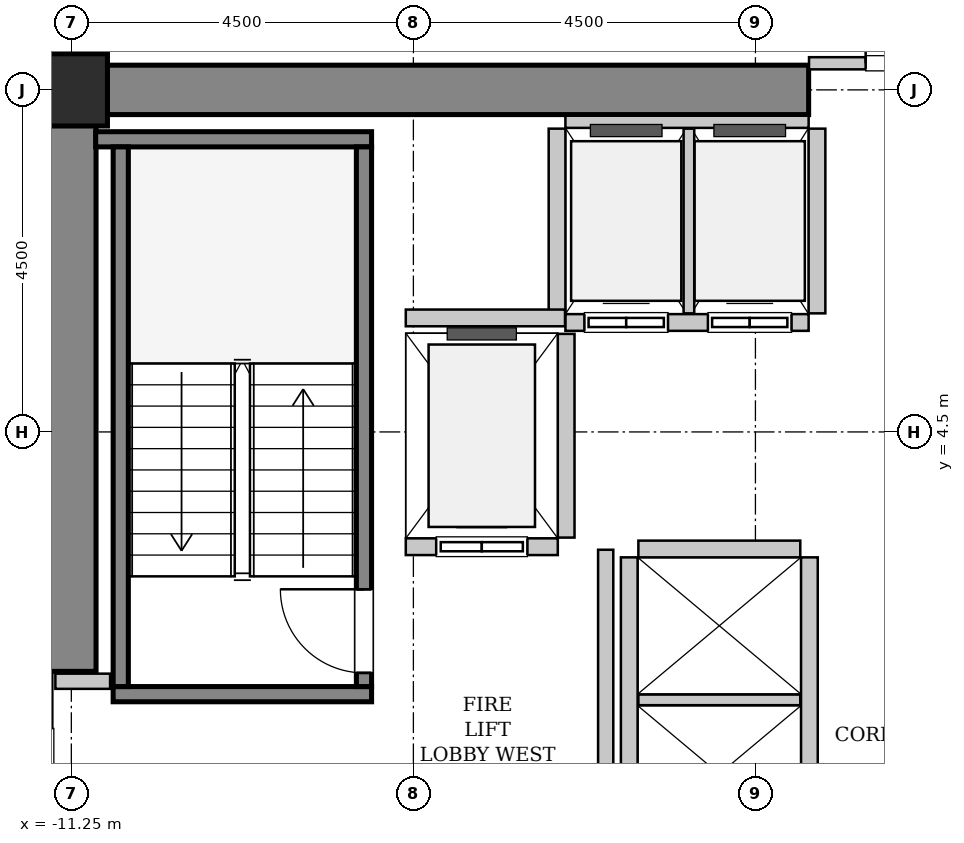
"""IFC4 building model, lengths in metres.
Left out: names, types, materials, properties, quantities, classifications, styles, units other than length and angle.
Written with IfcOpenShell. Run it as: python <this file> out.ifc"""

import sys

from ifc_helpers import new_model, si_unit, direction, frame, frame_2d, origin, origin_2d, place, context, subcontext, project, spatial, rectangle, hollow_rectangle, extrude, source, transform, mapped, element, fill, save


model = new_model("IFC4")
c1 = context("Model", 3, precision=1e-05, world=origin(), true_north=direction((0.0, 1.0)))
c2 = subcontext(c1, "Body", "Model", "MODEL_VIEW")
j1 = project(units=[si_unit("LENGTHUNIT", "METRE"), si_unit("PLANEANGLEUNIT", "RADIAN")], contexts=[c1])
p1 = place(None, origin())
s1 = spatial("IfcSite", under=j1, at=p1, CompositionType="ELEMENT")
p2 = place(p1, origin())
s2 = spatial("IfcBuilding", under=s1, at=p2, CompositionType="ELEMENT")
p3 = place(p2, frame((0.0, 0.0, 55.8)))
s3 = spatial("IfcBuildingStorey", under=s2, at=p3, CompositionType="ELEMENT", Elevation=55.8)
m1 = source(origin(), c2, "Body", "SweptSolid", [
    extrude(rectangle(XDim=10.025, YDim=0.65, at=frame_2d((5.012, 0.0))), origin(), (0.0, 0.0, 1.0), 3.8),
])
p4 = place(p3, frame((-11.575, 9.0, 0.0), z_axis=(0.0, 0.0, 1.0), x_axis=(1.0, 0.0, 0.0)))
e1 = element("IfcWall", 1, at=p4, inside=s3, PredefinedType="SHEAR", context=c2, shape_type="MappedRepresentation", body=[
    mapped(m1, transform((0.0, 0.0, 0.0), x_axis=(1.0, 0.0, 0.0), y_axis=(0.0, 1.0, 0.0), z_axis=(0.0, 0.0, 1.0), scale=1.0)),
])
m2 = source(origin(), c2, "Body", "SweptSolid", [
    extrude(rectangle(XDim=7.325, YDim=0.65, at=frame_2d((3.663, 0.0))), origin(), (0.0, 0.0, 1.0), 3.8),
])
p5 = place(p3, frame((-11.25, 1.35, 0.0), z_axis=(0.0, 0.0, 1.0), x_axis=(0.0, 1.0, 0.0)))
e2 = element("IfcWall", 2, at=p5, inside=s3, PredefinedType="SHEAR", context=c2, shape_type="MappedRepresentation", body=[
    mapped(m2, transform((0.0, 0.0, 0.0), x_axis=(1.0, 0.0, 0.0), y_axis=(0.0, 1.0, 0.0), z_axis=(0.0, 0.0, 1.0), scale=1.0)),
])
m3 = source(origin(), c2, "Body", "SweptSolid", [
    extrude(hollow_rectangle(XDim=0.95, YDim=0.95, WallThickness=0.045, InnerFilletRadius=0.045, OuterFilletRadius=0.09, at=origin_2d()), origin(), (0.0, 0.0, 1.0), 3.8),
])
p6 = place(p3, frame((-11.25, 9.0, 0.0), z_axis=(0.0, 0.0, 1.0), x_axis=(1.0, 0.0, 0.0)))
e3 = element("IfcColumn", 3, at=p6, inside=s3, PredefinedType="COLUMN", context=c2, shape_type="MappedRepresentation", body=[
    mapped(m3, transform((0.0, 0.0, 0.0), x_axis=(1.0, 0.0, 0.0), y_axis=(0.0, 1.0, 0.0), z_axis=(0.0, 0.0, 1.0), scale=1.0)),
])
m4 = source(origin(), c2, "Body", "SweptSolid", [
    extrude(rectangle(XDim=3.4, YDim=0.2, at=frame_2d((1.7, 0.0))), origin(), (0.0, 0.0, 1.0), 3.8),
])
p7 = place(p3, frame((-7.3, 1.05, 0.0), z_axis=(0.0, 0.0, 1.0), x_axis=(-1.0, 0.0, 0.0)))
e4 = element("IfcWall", 4, at=p7, inside=s3, PredefinedType="SOLIDWALL", context=c2, shape_type="MappedRepresentation", body=[
    mapped(m4, transform((0.0, 0.0, 0.0), x_axis=(1.0, 0.0, 0.0), y_axis=(0.0, 1.0, 0.0), z_axis=(0.0, 0.0, 1.0), scale=1.0)),
])
m5 = source(origin(), c2, "Body", "SweptSolid", [
    extrude(rectangle(XDim=3.63, YDim=0.2, at=frame_2d((1.815, 0.0))), origin(), (0.0, 0.0, 1.0), 3.8),
])
p8 = place(p3, frame((-7.3, 8.35, 0.0), z_axis=(0.0, 0.0, 1.0), x_axis=(-1.0, 0.0, 0.0)))
e5 = element("IfcWall", 5, at=p8, inside=s3, PredefinedType="SOLIDWALL", context=c2, shape_type="MappedRepresentation", body=[
    mapped(m5, transform((0.0, 0.0, 0.0), x_axis=(1.0, 0.0, 0.0), y_axis=(0.0, 1.0, 0.0), z_axis=(0.0, 0.0, 1.0), scale=1.0)),
])
m6 = source(origin(), c2, "Body", "SweptSolid", [
    extrude(rectangle(XDim=7.1, YDim=0.2, at=frame_2d((3.55, 0.0))), origin(), (0.0, 0.0, 1.0), 3.8),
])
p9 = place(p3, frame((-7.4, 1.15, 0.0), z_axis=(0.0, 0.0, 1.0), x_axis=(0.0, 1.0, 0.0)))
e6 = element("IfcWall", 6, at=p9, inside=s3, PredefinedType="SOLIDWALL", context=c2, shape_type="MappedRepresentation", body=[
    mapped(m6, transform((0.0, 0.0, 0.0), x_axis=(1.0, 0.0, 0.0), y_axis=(0.0, 1.0, 0.0), z_axis=(0.0, 0.0, 1.0), scale=1.0)),
])
p10 = place(p9, frame((0.18, 0.0, 0.0)))
e7 = element("IfcOpeningElement", 7, at=p10, cuts=e6, PredefinedType="OPENING", context=c2, shape_type="SweptSolid", body=[
    extrude(rectangle(XDim=1.1, YDim=2.15, at=frame_2d((0.55, 1.075))), frame((0.0, 0.11, 0.0), z_axis=(0.0, -1.0, 0.0), x_axis=(1.0, 0.0, 0.0)), (0.0, 0.0, 1.0), 0.22),
])
p11 = place(p3, frame((-10.6, 1.15, 0.0), z_axis=(0.0, 0.0, 1.0), x_axis=(0.0, 1.0, 0.0)))
e8 = element("IfcWall", 8, at=p11, inside=s3, PredefinedType="SOLIDWALL", context=c2, shape_type="MappedRepresentation", body=[
    mapped(m6, transform((0.0, 0.0, 0.0), x_axis=(1.0, 0.0, 0.0), y_axis=(0.0, 1.0, 0.0), z_axis=(0.0, 0.0, 1.0), scale=1.0)),
])
m7 = source(origin(), c2, "Body", "SweptSolid", [
    extrude(rectangle(XDim=2.0, YDim=0.22, at=frame_2d((1.0, 0.0))), origin(), (0.0, 0.0, 1.0), 3.535),
])
p12 = place(p3, frame((-6.85, 2.99, 0.0), z_axis=(0.0, 0.0, 1.0), x_axis=(1.0, 0.0, 0.0)))
e9 = element("IfcWall", 9, at=p12, inside=s3, PredefinedType="SOLIDWALL", context=c2, shape_type="MappedRepresentation", body=[
    mapped(m7, transform((0.0, 0.0, 0.0), x_axis=(1.0, 0.0, 0.0), y_axis=(0.0, 1.0, 0.0), z_axis=(0.0, 0.0, 1.0), scale=1.0)),
])
p13 = place(p12, frame((0.4, 0.0, 0.0)))
e10 = element("IfcOpeningElement", 10, at=p13, cuts=e9, PredefinedType="OPENING", context=c2, shape_type="SweptSolid", body=[
    extrude(rectangle(XDim=1.2, YDim=2.2, at=frame_2d((0.6, 1.1))), frame((0.0, 0.12, 0.0), z_axis=(0.0, -1.0, 0.0), x_axis=(1.0, 0.0, 0.0)), (0.0, 0.0, 1.0), 0.24),
])
m8 = source(origin(), c2, "Body", "SweptSolid", [
    extrude(rectangle(XDim=2.68, YDim=0.22, at=frame_2d((1.34, 0.0))), origin(), (0.0, 0.0, 1.0), 3.535),
])
p14 = place(p3, frame((-4.74, 3.11, 0.0), z_axis=(0.0, 0.0, 1.0), x_axis=(0.0, 1.0, 0.0)))
e11 = element("IfcWall", 11, at=p14, inside=s3, PredefinedType="SOLIDWALL", context=c2, shape_type="MappedRepresentation", body=[
    mapped(m8, transform((0.0, 0.0, 0.0), x_axis=(1.0, 0.0, 0.0), y_axis=(0.0, 1.0, 0.0), z_axis=(0.0, 0.0, 1.0), scale=1.0)),
])
m9 = source(origin(), c2, "Body", "SweptSolid", [
    extrude(rectangle(XDim=3.2, YDim=0.22, at=frame_2d((1.6, 0.0))), origin(), (0.0, 0.0, 1.0), 3.535),
])
p15 = place(p3, frame((-4.75, 5.94, 0.0), z_axis=(0.0, 0.0, 1.0), x_axis=(1.0, 0.0, 0.0)))
e12 = element("IfcWall", 12, at=p15, inside=s3, PredefinedType="SOLIDWALL", context=c2, shape_type="MappedRepresentation", body=[
    mapped(m9, transform((0.0, 0.0, 0.0), x_axis=(1.0, 0.0, 0.0), y_axis=(0.0, 1.0, 0.0), z_axis=(0.0, 0.0, 1.0), scale=1.0)),
])
p16 = place(p15, frame((0.25, 0.0, 0.0)))
e13 = element("IfcOpeningElement", 13, at=p16, cuts=e12, PredefinedType="OPENING", context=c2, shape_type="SweptSolid", body=[
    extrude(rectangle(XDim=1.1, YDim=2.2, at=frame_2d((0.55, 1.1))), frame((0.0, 0.12, 0.0), z_axis=(0.0, -1.0, 0.0), x_axis=(1.0, 0.0, 0.0)), (0.0, 0.0, 1.0), 0.24),
])
p17 = place(p15, frame((1.875, 0.0, 0.0)))
e14 = element("IfcOpeningElement", 14, at=p17, cuts=e12, PredefinedType="OPENING", context=c2, shape_type="SweptSolid", body=[
    extrude(rectangle(XDim=1.1, YDim=2.2, at=frame_2d((0.55, 1.1))), frame((0.0, 0.12, 0.0), z_axis=(0.0, -1.0, 0.0), x_axis=(1.0, 0.0, 0.0)), (0.0, 0.0, 1.0), 0.24),
])
m10 = source(origin(), c2, "Body", "SweptSolid", [
    extrude(rectangle(XDim=3.2, YDim=0.16, at=frame_2d((1.6, 0.0))), origin(), (0.0, 0.0, 1.0), 2.425),
])
p18 = place(p3, frame((-1.55, 8.58, 0.0), z_axis=(0.0, 0.0, 1.0), x_axis=(-1.0, 0.0, 0.0)))
e15 = element("IfcWall", 15, at=p18, inside=s3, PredefinedType="PARTITIONING", context=c2, shape_type="MappedRepresentation", body=[
    mapped(m10, transform((0.0, 0.0, 0.0), x_axis=(1.0, 0.0, 0.0), y_axis=(0.0, 1.0, 0.0), z_axis=(0.0, 0.0, 1.0), scale=1.0)),
])
m11 = source(origin(), c2, "Body", "SweptSolid", [
    extrude(rectangle(XDim=2.43, YDim=0.22, at=frame_2d((1.215, 0.0))), origin(), (0.0, 0.0, 1.0), 3.535),
])
p19 = place(p3, frame((-4.86, 8.49, 0.0), z_axis=(0.0, 0.0, 1.0), x_axis=(0.0, -1.0, 0.0)))
e16 = element("IfcWall", 16, at=p19, inside=s3, PredefinedType="SOLIDWALL", context=c2, shape_type="MappedRepresentation", body=[
    mapped(m11, transform((0.0, 0.0, 0.0), x_axis=(1.0, 0.0, 0.0), y_axis=(0.0, 1.0, 0.0), z_axis=(0.0, 0.0, 1.0), scale=1.0)),
])
m12 = source(origin(), c2, "Body", "SweptSolid", [
    extrude(rectangle(XDim=2.43, YDim=0.14, at=frame_2d((1.215, 0.0))), origin(), (0.0, 0.0, 1.0), 3.535),
])
p20 = place(p3, frame((-3.125, 6.06, 0.0), z_axis=(0.0, 0.0, 1.0), x_axis=(0.0, 1.0, 0.0)))
e17 = element("IfcWall", 17, at=p20, inside=s3, PredefinedType="PARTITIONING", context=c2, shape_type="MappedRepresentation", body=[
    mapped(m12, transform((0.0, 0.0, 0.0), x_axis=(1.0, 0.0, 0.0), y_axis=(0.0, 1.0, 0.0), z_axis=(0.0, 0.0, 1.0), scale=1.0)),
])
p21 = place(p3, frame((-1.44, 6.06, 0.0), z_axis=(0.0, 0.0, 1.0), x_axis=(0.0, 1.0, 0.0)))
e18 = element("IfcWall", 18, at=p21, inside=s3, PredefinedType="SOLIDWALL", context=c2, shape_type="MappedRepresentation", body=[
    mapped(m11, transform((0.0, 0.0, 0.0), x_axis=(1.0, 0.0, 0.0), y_axis=(0.0, 1.0, 0.0), z_axis=(0.0, 0.0, 1.0), scale=1.0)),
])
m13 = source(origin(), c2, "Body", "SweptSolid", [
    extrude(rectangle(XDim=5.7, YDim=0.22, at=frame_2d((2.85, 0.0))), origin(), (0.0, 0.0, 1.0), 3.535),
])
for number, where, z_axis, x_axis in (
    (19, (-1.54, -2.85, 0.0), (0.0, 0.0, 1.0), (0.0, 1.0, 0.0)),
    (20, (-3.91, 2.85, 0.0), (0.0, 0.0, 1.0), (0.0, -1.0, 0.0)),
):
    element("IfcWall", number, at=place(p3, frame(where, z_axis=z_axis, x_axis=x_axis)), inside=s3, PredefinedType="SOLIDWALL", context=c2, shape_type="MappedRepresentation", body=[
        mapped(m13, transform((0.0, 0.0, 0.0), x_axis=(1.0, 0.0, 0.0), y_axis=(0.0, 1.0, 0.0), z_axis=(0.0, 0.0, 1.0), scale=1.0)),
    ])
m14 = source(origin(), c2, "Body", "SweptSolid", [
    extrude(rectangle(XDim=2.13, YDim=0.14, at=frame_2d((1.065, 0.0))), origin(), (0.0, 0.0, 1.0), 3.535),
])
p22 = place(p3, frame((-3.79, 0.975, 0.0), z_axis=(0.0, 0.0, 1.0), x_axis=(1.0, 0.0, 0.0)))
e21 = element("IfcWall", 21, at=p22, inside=s3, PredefinedType="PARTITIONING", context=c2, shape_type="MappedRepresentation", body=[
    mapped(m14, transform((0.0, 0.0, 0.0), x_axis=(1.0, 0.0, 0.0), y_axis=(0.0, 1.0, 0.0), z_axis=(0.0, 0.0, 1.0), scale=1.0)),
])
m15 = source(origin(), c2, "Body", "SweptSolid", [
    extrude(rectangle(XDim=2.13, YDim=0.22, at=frame_2d((1.065, 0.0))), origin(), (0.0, 0.0, 1.0), 3.535),
])
p23 = place(p3, frame((-1.66, 2.96, 0.0), z_axis=(0.0, 0.0, 1.0), x_axis=(-1.0, 0.0, 0.0)))
e22 = element("IfcWall", 22, at=p23, inside=s3, PredefinedType="SOLIDWALL", context=c2, shape_type="MappedRepresentation", body=[
    mapped(m15, transform((0.0, 0.0, 0.0), x_axis=(1.0, 0.0, 0.0), y_axis=(0.0, 1.0, 0.0), z_axis=(0.0, 0.0, 1.0), scale=1.0)),
])
m16 = source(origin(), c2, "Body", "SweptSolid", [
    extrude(rectangle(XDim=2.095, YDim=0.22, at=frame_2d((1.048, 0.0))), origin(), (0.0, 0.0, 1.0), 3.535),
])
p24 = place(p3, frame((-6.85, 6.0, 0.0), z_axis=(0.0, 0.0, 1.0), x_axis=(1.0, 0.0, 0.0)))
e23 = element("IfcWall", 23, at=p24, inside=s3, PredefinedType="SOLIDWALL", context=c2, shape_type="MappedRepresentation", body=[
    mapped(m16, transform((0.0, 0.0, 0.0), x_axis=(1.0, 0.0, 0.0), y_axis=(0.0, 1.0, 0.0), z_axis=(0.0, 0.0, 1.0), scale=1.0)),
])
m17 = source(origin(), c2, "Body", "SweptSolid", [
    extrude(rectangle(XDim=5.9, YDim=0.2, at=frame_2d((2.95, 0.0))), origin(), (0.0, 0.0, 1.0), 3.535),
])
p25 = place(p3, frame((-4.22, -2.95, 0.0), z_axis=(0.0, 0.0, 1.0), x_axis=(0.0, 1.0, 0.0)))
e24 = element("IfcWall", 24, at=p25, inside=s3, PredefinedType="PARTITIONING", context=c2, shape_type="MappedRepresentation", body=[
    mapped(m17, transform((0.0, 0.0, 0.0), x_axis=(1.0, 0.0, 0.0), y_axis=(0.0, 1.0, 0.0), z_axis=(0.0, 0.0, 1.0), scale=1.0)),
])
m18 = source(origin(), c2, "Body", "SweptSolid", [
    extrude(rectangle(XDim=0.72, YDim=0.2, at=frame_2d((0.36, 0.0))), origin(), (0.0, 0.0, 1.0), 3.535),
])
p26 = place(p3, frame((-11.46, 1.22, 0.0), z_axis=(0.0, 0.0, 1.0), x_axis=(1.0, 0.0, 0.0)))
e25 = element("IfcWall", 25, at=p26, inside=s3, PredefinedType="PARTITIONING", context=c2, shape_type="MappedRepresentation", body=[
    mapped(m18, transform((0.0, 0.0, 0.0), x_axis=(1.0, 0.0, 0.0), y_axis=(0.0, 1.0, 0.0), z_axis=(0.0, 0.0, 1.0), scale=1.0)),
])
m19 = source(origin(), c2, "Body", "SweptSolid", [
    extrude(rectangle(XDim=3.09, YDim=0.16, at=frame_2d((1.545, 0.0))), origin(), (0.0, 0.0, 1.0), 2.425),
])
p27 = place(p3, frame((-1.545, 9.35, 0.0), z_axis=(0.0, 0.0, 1.0), x_axis=(1.0, 0.0, 0.0)))
e26 = element("IfcWall", 26, at=p27, inside=s3, PredefinedType="PARTITIONING", context=c2, shape_type="MappedRepresentation", body=[
    mapped(m19, transform((0.0, 0.0, 0.0), x_axis=(1.0, 0.0, 0.0), y_axis=(0.0, 1.0, 0.0), z_axis=(0.0, 0.0, 1.0), scale=1.0)),
])
p28 = place(p27, frame((0.745, 0.0, 0.0)))
e27 = element("IfcOpeningElement", 27, at=p28, cuts=e26, PredefinedType="OPENING", context=c2, shape_type="SweptSolid", body=[
    extrude(rectangle(XDim=1.6, YDim=2.3, at=frame_2d((0.8, 1.15))), frame((0.0, 0.09, 0.0), z_axis=(0.0, -1.0, 0.0), x_axis=(1.0, 0.0, 0.0)), (0.0, 0.0, 1.0), 0.18),
])
m20 = source(origin(), c2, "Body", "SweptSolid", [
    extrude(rectangle(XDim=1.1, YDim=2.15, at=frame_2d((0.55, 1.075))), frame((0.0, 0.025, 0.0), z_axis=(0.0, -1.0, 0.0), x_axis=(1.0, 0.0, 0.0)), (0.0, 0.0, 1.0), 0.05),
])
p29 = place(p10, origin())
e28 = element("IfcDoor", 28, at=p29, inside=s3, OperationType="SINGLE_SWING_RIGHT", PredefinedType="DOOR", context=c2, shape_type="MappedRepresentation", body=[
    mapped(m20, transform((0.0, 0.0, 0.0), x_axis=(1.0, 0.0, 0.0), y_axis=(0.0, 1.0, 0.0), z_axis=(0.0, 0.0, 1.0), scale=1.0)),
])
fill(e7, e28)
m21 = source(origin(), c2, "Body", "SweptSolid", [
    extrude(rectangle(XDim=1.2, YDim=2.2, at=frame_2d((0.6, 1.1))), frame((0.0, 0.025, 0.0), z_axis=(0.0, -1.0, 0.0), x_axis=(1.0, 0.0, 0.0)), (0.0, 0.0, 1.0), 0.05),
])
p30 = place(p13, origin())
e29 = element("IfcDoor", 29, at=p30, inside=s3, OperationType="SLIDING_TO_LEFT", PredefinedType="DOOR", context=c2, shape_type="MappedRepresentation", body=[
    mapped(m21, transform((0.0, 0.0, 0.0), x_axis=(1.0, 0.0, 0.0), y_axis=(0.0, 1.0, 0.0), z_axis=(0.0, 0.0, 1.0), scale=1.0)),
])
fill(e10, e29)
m22 = source(origin(), c2, "Body", "SweptSolid", [
    extrude(rectangle(XDim=1.1, YDim=2.2, at=frame_2d((0.55, 1.1))), frame((0.0, 0.025, 0.0), z_axis=(0.0, -1.0, 0.0), x_axis=(1.0, 0.0, 0.0)), (0.0, 0.0, 1.0), 0.05),
])
p31 = place(p16, origin())
e30 = element("IfcDoor", 30, at=p31, inside=s3, OperationType="DOUBLE_DOOR_SLIDING", PredefinedType="DOOR", context=c2, shape_type="MappedRepresentation", body=[
    mapped(m22, transform((0.0, 0.0, 0.0), x_axis=(1.0, 0.0, 0.0), y_axis=(0.0, 1.0, 0.0), z_axis=(0.0, 0.0, 1.0), scale=1.0)),
])
fill(e13, e30)
p32 = place(p17, origin())
e31 = element("IfcDoor", 31, at=p32, inside=s3, OperationType="DOUBLE_DOOR_SLIDING", PredefinedType="DOOR", context=c2, shape_type="MappedRepresentation", body=[
    mapped(m22, transform((0.0, 0.0, 0.0), x_axis=(1.0, 0.0, 0.0), y_axis=(0.0, 1.0, 0.0), z_axis=(0.0, 0.0, 1.0), scale=1.0)),
])
fill(e14, e31)
m23 = source(origin(), c2, "Body", "SweptSolid", [
    extrude(rectangle(XDim=1.6, YDim=2.3, at=frame_2d((0.8, 1.15))), frame((0.0, 0.025, 0.0), z_axis=(0.0, -1.0, 0.0), x_axis=(1.0, 0.0, 0.0)), (0.0, 0.0, 1.0), 0.05),
])
p33 = place(p28, origin())
e32 = element("IfcDoor", 32, at=p33, inside=s3, OperationType="DOUBLE_DOOR_SINGLE_SWING", PredefinedType="DOOR", context=c2, shape_type="MappedRepresentation", body=[
    mapped(m23, transform((0.0, 0.0, 0.0), x_axis=(1.0, 0.0, 0.0), y_axis=(0.0, 1.0, 0.0), z_axis=(0.0, 0.0, 1.0), scale=1.0)),
])
fill(e27, e32)
save(model, sys.argv[1])
